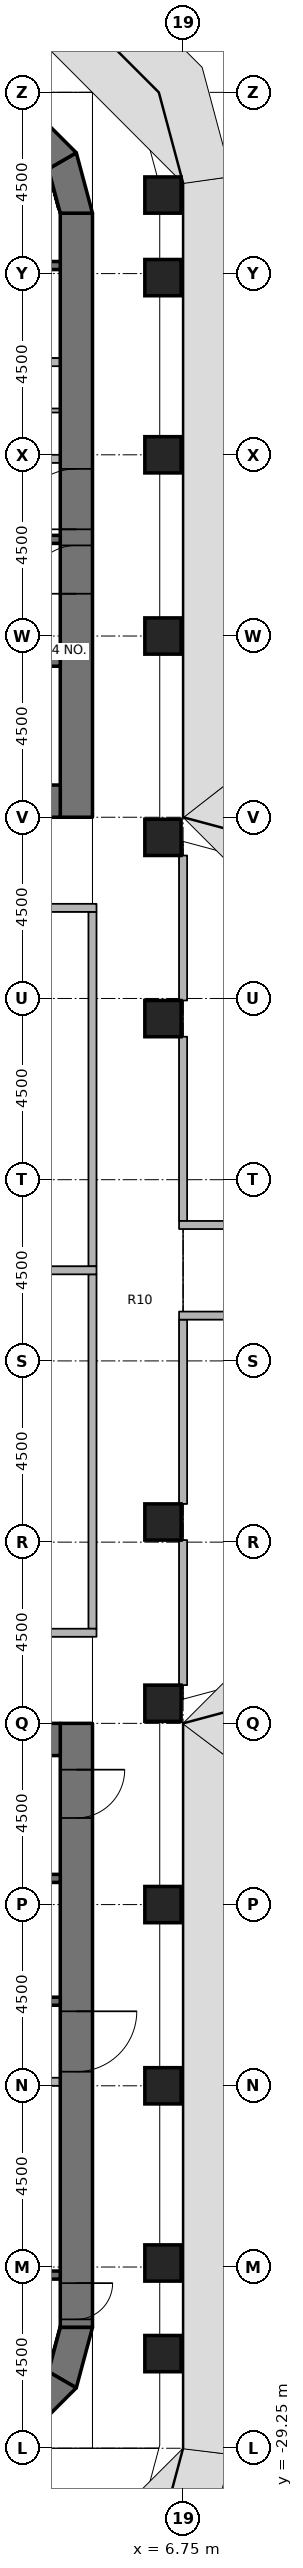
"""IFC4 building model, lengths in metres.
Left out: names, types, materials, properties, quantities, classifications, styles, units other than length and angle.
Written with IfcOpenShell. Run it as: python <this file> out.ifc"""

import sys

from ifc_helpers import new_model, si_unit, direction, frame, frame_2d, origin, origin_2d, place, context, subcontext, project, spatial, polyline, rectangle, outline, extrude, element, fill, save


model = new_model("IFC4")
c1 = context("Model", 3, precision=1e-05, world=origin(), true_north=direction((0.0, 1.0)))
c2 = subcontext(c1, "Body", "Model", "MODEL_VIEW")
j1 = project(units=[si_unit("LENGTHUNIT", "METRE"), si_unit("PLANEANGLEUNIT", "RADIAN")], contexts=[c1])
p1 = place(None, origin())
s1 = spatial("IfcSite", under=j1, at=p1, CompositionType="ELEMENT")
p2 = place(p1, origin())
s2 = spatial("IfcBuilding", under=s1, at=p2, CompositionType="ELEMENT")
p3 = place(p2, frame((0.0, 0.0, 117.0)))
s3 = spatial("IfcBuildingStorey", under=s2, at=p3, CompositionType="ELEMENT", Elevation=117.0)
for number, where, z_axis, x_axis in (
    (1, (6.25, -26.9, 0.0), (0.0, 0.0, 1.0), (1.0, 0.0, 0.0)),
    (2, (6.25, -24.65, 0.0), (0.0, 0.0, 1.0), (1.0, 0.0, 0.0)),
    (3, (6.25, -20.25, 0.0), (0.0, 0.0, 1.0), (1.0, 0.0, 0.0)),
    (4, (6.25, -15.75, 0.0), (0.0, 0.0, 1.0), (1.0, 0.0, 0.0)),
    (5, (6.25, -10.75, 0.0), (0.0, 0.0, 1.0), (1.0, 0.0, 0.0)),
    (6, (6.25, -6.25, 0.0), (0.0, 0.0, 1.0), (1.0, 0.0, 0.0)),
    (7, (6.25, 6.25, 0.0), (0.0, 0.0, 1.0), (1.0, 0.0, 0.0)),
    (8, (6.25, 10.75, 0.0), (0.0, 0.0, 1.0), (1.0, 0.0, 0.0)),
    (9, (6.25, 15.75, 0.0), (0.0, 0.0, 1.0), (1.0, 0.0, 0.0)),
    (10, (6.25, 20.25, 0.0), (0.0, 0.0, 1.0), (1.0, 0.0, 0.0)),
    (11, (6.25, 24.65, 0.0), (0.0, 0.0, 1.0), (1.0, 0.0, 0.0)),
    (12, (6.25, 26.7, 0.0), (0.0, 0.0, 1.0), (1.0, 0.0, 0.0)),
):
    element("IfcColumn", number, at=place(p3, frame(where, z_axis=z_axis, x_axis=x_axis)), inside=s3, PredefinedType="COLUMN", context=c2, shape_type="SweptSolid", body=[
        extrude(rectangle(XDim=0.9, YDim=0.9, at=origin_2d()), origin(), (0.0, 0.0, 1.0), 3.65),
    ])
p4 = place(p3, frame((4.1, 11.25, 0.0), z_axis=(0.0, 0.0, 1.0), x_axis=(0.0, 1.0, 0.0)))
e13 = element("IfcWall", 13, at=p4, inside=s3, PredefinedType="SHEAR", context=c2, shape_type="SweptSolid", body=[
    extrude(rectangle(XDim=15.0, YDim=0.8, at=frame_2d((7.5, 0.0))), origin(), (0.0, 0.0, 1.0), 3.8),
])
p5 = place(p4, frame((7.15, 0.0, 0.0)))
e14 = element("IfcOpeningElement", 14, at=p5, cuts=e13, PredefinedType="OPENING", context=c2, shape_type="SweptSolid", body=[
    extrude(rectangle(XDim=1.5, YDim=2.3, at=frame_2d((0.75, 1.15))), frame((0.0, 0.41, 0.0), z_axis=(0.0, -1.0, 0.0), x_axis=(1.0, 0.0, 0.0)), (0.0, 0.0, 1.0), 0.82),
])
p6 = place(p4, frame((5.55, 0.0, 0.0)))
e15 = element("IfcOpeningElement", 15, at=p6, cuts=e13, PredefinedType="OPENING", context=c2, shape_type="SweptSolid", body=[
    extrude(rectangle(XDim=1.2, YDim=2.1, at=frame_2d((0.6, 1.05))), frame((0.0, 0.41, 0.0), z_axis=(0.0, -1.0, 0.0), x_axis=(1.0, 0.0, 0.0)), (0.0, 0.0, 1.0), 0.82),
])
p7 = place(p3, frame((-3.7, 11.65, 0.0), z_axis=(0.0, 0.0, 1.0), x_axis=(1.0, 0.0, 0.0)))
e16 = element("IfcWall", 16, at=p7, inside=s3, PredefinedType="SHEAR", context=c2, shape_type="SweptSolid", body=[
    extrude(rectangle(XDim=7.4, YDim=0.8, at=frame_2d((3.7, 0.0))), origin(), (0.0, 0.0, 1.0), 3.8),
])
p8 = place(p3, origin())
e17 = element("IfcWall", 17, at=p8, inside=s3, PredefinedType="SHEAR", context=c2, shape_type="SweptSolid", body=[
    extrude(outline(polyline([(4.5, 26.25), (4.098, 27.75), (3.405, 27.35), (3.7, 26.25), (4.5, 26.25)])), origin(), (0.0, 0.0, 1.0), 3.8),
])
p9 = place(p3, origin())
e18 = element("IfcWall", 18, at=p9, inside=s3, PredefinedType="SHEAR", context=c2, shape_type="SweptSolid", body=[
    extrude(outline(polyline([(4.098, 27.75), (3.0, 28.848), (2.6, 28.155), (3.405, 27.35), (4.098, 27.75)])), origin(), (0.0, 0.0, 1.0), 3.8),
])
p10 = place(p3, frame((4.1, -11.25, 0.0), z_axis=(0.0, 0.0, 1.0), x_axis=(0.0, -1.0, 0.0)))
e19 = element("IfcWall", 19, at=p10, inside=s3, PredefinedType="SHEAR", context=c2, shape_type="SweptSolid", body=[
    extrude(rectangle(XDim=15.0, YDim=0.8, at=frame_2d((7.5, 0.0))), origin(), (0.0, 0.0, 1.0), 3.8),
])
p11 = place(p10, frame((7.15, 0.0, 0.0)))
e20 = element("IfcOpeningElement", 20, at=p11, cuts=e19, PredefinedType="OPENING", context=c2, shape_type="SweptSolid", body=[
    extrude(rectangle(XDim=1.5, YDim=2.3, at=frame_2d((0.75, 1.15))), frame((0.0, 0.41, 0.0), z_axis=(0.0, -1.0, 0.0), x_axis=(1.0, 0.0, 0.0)), (0.0, 0.0, 1.0), 0.82),
])
p12 = place(p10, frame((13.9, 0.0, 0.0)))
e21 = element("IfcOpeningElement", 21, at=p12, cuts=e19, PredefinedType="OPENING", context=c2, shape_type="SweptSolid", body=[
    extrude(rectangle(XDim=0.9, YDim=2.1, at=frame_2d((0.45, 1.05))), frame((0.0, 0.41, 0.0), z_axis=(0.0, -1.0, 0.0), x_axis=(1.0, 0.0, 0.0)), (0.0, 0.0, 1.0), 0.82),
])
p13 = place(p10, frame((1.15, 0.0, 0.0)))
e22 = element("IfcOpeningElement", 22, at=p13, cuts=e19, PredefinedType="OPENING", context=c2, shape_type="SweptSolid", body=[
    extrude(rectangle(XDim=1.2, YDim=2.1, at=frame_2d((0.6, 1.05))), frame((0.0, 0.41, 0.0), z_axis=(0.0, -1.0, 0.0), x_axis=(1.0, 0.0, 0.0)), (0.0, 0.0, 1.0), 0.82),
])
p14 = place(p3, frame((-3.7, -11.65, 0.0), z_axis=(0.0, 0.0, 1.0), x_axis=(1.0, 0.0, 0.0)))
e23 = element("IfcWall", 23, at=p14, inside=s3, PredefinedType="SHEAR", context=c2, shape_type="SweptSolid", body=[
    extrude(rectangle(XDim=7.4, YDim=0.8, at=frame_2d((3.7, 0.0))), origin(), (0.0, 0.0, 1.0), 3.8),
])
p15 = place(p3, origin())
e24 = element("IfcWall", 24, at=p15, inside=s3, PredefinedType="SHEAR", context=c2, shape_type="SweptSolid", body=[
    extrude(outline(polyline([(4.5, -26.25), (4.098, -27.75), (3.405, -27.35), (3.7, -26.25), (4.5, -26.25)])), origin(), (0.0, 0.0, 1.0), 3.8),
])
p16 = place(p3, origin())
e25 = element("IfcWall", 25, at=p16, inside=s3, PredefinedType="SHEAR", context=c2, shape_type="SweptSolid", body=[
    extrude(outline(polyline([(4.098, -27.75), (3.0, -28.848), (2.6, -28.155), (3.405, -27.35), (4.098, -27.75)])), origin(), (0.0, 0.0, 1.0), 3.8),
])
for number, where, z_axis, x_axis in (
    (26, (-3.7, 24.95, 0.0), (0.0, 0.0, 1.0), (1.0, 0.0, 0.0)),
    (27, (-3.7, 18.15, 0.0), (0.0, 0.0, 1.0), (1.0, 0.0, 0.0)),
    (28, (-3.7, 15.1, 0.0), (0.0, 0.0, 1.0), (1.0, 0.0, 0.0)),
):
    element("IfcWall", number, at=place(p3, frame(where, z_axis=z_axis, x_axis=x_axis)), inside=s3, PredefinedType="SHEAR", context=c2, shape_type="SweptSolid", body=[
        extrude(rectangle(XDim=7.4, YDim=0.2, at=frame_2d((3.7, 0.0))), origin(), (0.0, 0.0, 1.0), 3.65),
    ])
p17 = place(p3, frame((0.9, 20.15, 0.0), z_axis=(0.0, 0.0, 1.0), x_axis=(1.0, 0.0, 0.0)))
e29 = element("IfcWall", 29, at=p17, inside=s3, PredefinedType="PARTITIONING", context=c2, shape_type="SweptSolid", body=[
    extrude(rectangle(XDim=2.8, YDim=0.2, at=frame_2d((1.4, 0.0))), origin(), (0.0, 0.0, 1.0), 3.65),
])
p18 = place(p3, frame((1.1, 22.55, 0.0), z_axis=(0.0, 0.0, 1.0), x_axis=(1.0, 0.0, 0.0)))
e30 = element("IfcWall", 30, at=p18, inside=s3, PredefinedType="PARTITIONING", context=c2, shape_type="SweptSolid", body=[
    extrude(rectangle(XDim=2.6, YDim=0.2, at=frame_2d((1.3, 0.0))), origin(), (0.0, 0.0, 1.0), 3.65),
])
p19 = place(p3, frame((1.1, 21.35, 0.0), z_axis=(0.0, 0.0, 1.0), x_axis=(1.0, 0.0, 0.0)))
e31 = element("IfcWall", 31, at=p19, inside=s3, PredefinedType="PARTITIONING", context=c2, shape_type="SweptSolid", body=[
    extrude(rectangle(XDim=2.6, YDim=0.1, at=frame_2d((1.3, 0.0))), origin(), (0.0, 0.0, 1.0), 3.65),
])
for number, where, z_axis, x_axis in (
    (32, (3.7, -24.95, 0.0), (0.0, 0.0, 1.0), (-1.0, 0.0, 0.0)),
    (33, (3.7, -18.15, 0.0), (0.0, 0.0, 1.0), (-1.0, 0.0, 0.0)),
    (34, (3.7, -15.1, 0.0), (0.0, 0.0, 1.0), (-1.0, 0.0, 0.0)),
):
    element("IfcWall", number, at=place(p3, frame(where, z_axis=z_axis, x_axis=x_axis)), inside=s3, PredefinedType="SHEAR", context=c2, shape_type="SweptSolid", body=[
        extrude(rectangle(XDim=7.4, YDim=0.2, at=frame_2d((3.7, 0.0))), origin(), (0.0, 0.0, 1.0), 3.65),
    ])
p20 = place(p3, frame((3.7, -20.15, 0.0), z_axis=(0.0, 0.0, 1.0), x_axis=(-1.0, 0.0, 0.0)))
e35 = element("IfcWall", 35, at=p20, inside=s3, PredefinedType="PARTITIONING", context=c2, shape_type="SweptSolid", body=[
    extrude(rectangle(XDim=2.8, YDim=0.2, at=frame_2d((1.4, 0.0))), origin(), (0.0, 0.0, 1.0), 3.65),
])
for number, where, z_axis, x_axis in (
    (36, (4.5, 0.1, 0.0), (0.0, 0.0, 1.0), (0.0, 1.0, 0.0)),
    (37, (4.5, -8.9, 0.0), (0.0, 0.0, 1.0), (0.0, 1.0, 0.0)),
):
    element("IfcWall", number, at=place(p3, frame(where, z_axis=z_axis, x_axis=x_axis)), inside=s3, PredefinedType="PARTITIONING", context=c2, shape_type="SweptSolid", body=[
        extrude(rectangle(XDim=8.8, YDim=0.2, at=frame_2d((4.4, 0.0))), origin(), (0.0, 0.0, 1.0), 2.738),
    ])
p21 = place(p3, frame((6.75, 1.225, 0.0), z_axis=(0.0, 0.0, 1.0), x_axis=(0.0, 1.0, 0.0)))
e38 = element("IfcWall", 38, at=p21, inside=s3, PredefinedType="PARTITIONING", context=c2, shape_type="SweptSolid", body=[
    extrude(rectangle(XDim=4.575, YDim=0.2, at=frame_2d((2.288, 0.0))), origin(), (0.0, 0.0, 1.0), 2.738),
])
for number, where, z_axis, x_axis in (
    (39, (6.75, 6.7, 0.0), (0.0, 0.0, 1.0), (0.0, 1.0, 0.0)),
    (40, (6.75, -10.3, 0.0), (0.0, 0.0, 1.0), (0.0, 1.0, 0.0)),
):
    element("IfcWall", number, at=place(p3, frame(where, z_axis=z_axis, x_axis=x_axis)), inside=s3, PredefinedType="PARTITIONING", context=c2, shape_type="SweptSolid", body=[
        extrude(rectangle(XDim=3.6, YDim=0.2, at=frame_2d((1.8, 0.0))), origin(), (0.0, 0.0, 1.0), 2.738),
    ])
p22 = place(p3, frame((6.75, -5.8, 0.0), z_axis=(0.0, 0.0, 1.0), x_axis=(0.0, 1.0, 0.0)))
e41 = element("IfcWall", 41, at=p22, inside=s3, PredefinedType="PARTITIONING", context=c2, shape_type="SweptSolid", body=[
    extrude(rectangle(XDim=4.575, YDim=0.2, at=frame_2d((2.288, 0.0))), origin(), (0.0, 0.0, 1.0), 2.738),
])
p23 = place(p3, frame((4.6, 9.0, 0.0), z_axis=(0.0, 0.0, 1.0), x_axis=(-1.0, 0.0, 0.0)))
e42 = element("IfcWall", 42, at=p23, inside=s3, PredefinedType="PARTITIONING", context=c2, shape_type="SweptSolid", body=[
    extrude(rectangle(XDim=9.2, YDim=0.2, at=frame_2d((4.6, 0.0))), origin(), (0.0, 0.0, 1.0), 2.738),
])
p24 = place(p23, frame((4.1, 0.0, 0.0)))
e43 = element("IfcOpeningElement", 43, at=p24, cuts=e42, PredefinedType="OPENING", context=c2, shape_type="SweptSolid", body=[
    extrude(rectangle(XDim=1.0, YDim=2.1, at=frame_2d((0.5, 1.05))), frame((0.0, 0.11, 0.0), z_axis=(0.0, -1.0, 0.0), x_axis=(1.0, 0.0, 0.0)), (0.0, 0.0, 1.0), 0.22),
])
p25 = place(p3, frame((-4.6, -9.0, 0.0), z_axis=(0.0, 0.0, 1.0), x_axis=(1.0, 0.0, 0.0)))
e44 = element("IfcWall", 44, at=p25, inside=s3, PredefinedType="PARTITIONING", context=c2, shape_type="SweptSolid", body=[
    extrude(rectangle(XDim=9.2, YDim=0.2, at=frame_2d((4.6, 0.0))), origin(), (0.0, 0.0, 1.0), 2.738),
])
p26 = place(p25, frame((4.1, 0.0, 0.0)))
e45 = element("IfcOpeningElement", 45, at=p26, cuts=e44, PredefinedType="OPENING", context=c2, shape_type="SweptSolid", body=[
    extrude(rectangle(XDim=1.0, YDim=2.1, at=frame_2d((0.5, 1.05))), frame((0.0, 0.11, 0.0), z_axis=(0.0, -1.0, 0.0), x_axis=(1.0, 0.0, 0.0)), (0.0, 0.0, 1.0), 0.22),
])
p27 = place(p3, frame((-4.6, 0.0, 0.0), z_axis=(0.0, 0.0, 1.0), x_axis=(1.0, 0.0, 0.0)))
e46 = element("IfcWall", 46, at=p27, inside=s3, PredefinedType="PARTITIONING", context=c2, shape_type="SweptSolid", body=[
    extrude(rectangle(XDim=9.2, YDim=0.2, at=frame_2d((4.6, 0.0))), origin(), (0.0, 0.0, 1.0), 2.738),
])
p28 = place(p3, frame((6.65, 1.125, 0.0), z_axis=(0.0, 0.0, 1.0), x_axis=(1.0, 0.0, 0.0)))
e47 = element("IfcWall", 47, at=p28, inside=s3, PredefinedType="PARTITIONING", context=c2, shape_type="SweptSolid", body=[
    extrude(rectangle(XDim=4.7, YDim=0.2, at=frame_2d((2.35, 0.0))), origin(), (0.0, 0.0, 1.0), 2.738),
])
p29 = place(p28, frame((1.85, 0.0, 0.0)))
e48 = element("IfcOpeningElement", 48, at=p29, cuts=e47, PredefinedType="OPENING", context=c2, shape_type="SweptSolid", body=[
    extrude(rectangle(XDim=1.0, YDim=2.1, at=frame_2d((0.5, 1.05))), frame((0.0, 0.11, 0.0), z_axis=(0.0, -1.0, 0.0), x_axis=(1.0, 0.0, 0.0)), (0.0, 0.0, 1.0), 0.22),
])
p30 = place(p3, frame((11.35, -1.125, 0.0), z_axis=(0.0, 0.0, 1.0), x_axis=(-1.0, 0.0, 0.0)))
e49 = element("IfcWall", 49, at=p30, inside=s3, PredefinedType="PARTITIONING", context=c2, shape_type="SweptSolid", body=[
    extrude(rectangle(XDim=4.7, YDim=0.2, at=frame_2d((2.35, 0.0))), origin(), (0.0, 0.0, 1.0), 2.738),
])
p31 = place(p30, frame((1.85, 0.0, 0.0)))
e50 = element("IfcOpeningElement", 50, at=p31, cuts=e49, PredefinedType="OPENING", context=c2, shape_type="SweptSolid", body=[
    extrude(rectangle(XDim=1.0, YDim=2.1, at=frame_2d((0.5, 1.05))), frame((0.0, 0.11, 0.0), z_axis=(0.0, -1.0, 0.0), x_axis=(1.0, 0.0, 0.0)), (0.0, 0.0, 1.0), 0.22),
])
p32 = place(p5, origin())
e51 = element("IfcDoor", 51, at=p32, inside=s3, OperationType="DOUBLE_DOOR_SINGLE_SWING", PredefinedType="DOOR", context=c2, shape_type="SweptSolid", body=[
    extrude(rectangle(XDim=1.5, YDim=2.3, at=frame_2d((0.75, 1.15))), frame((0.0, 0.025, 0.0), z_axis=(0.0, -1.0, 0.0), x_axis=(1.0, 0.0, 0.0)), (0.0, 0.0, 1.0), 0.05),
])
fill(e14, e51)
p33 = place(p6, origin())
e52 = element("IfcDoor", 52, at=p33, inside=s3, OperationType="SINGLE_SWING_RIGHT", PredefinedType="DOOR", context=c2, shape_type="SweptSolid", body=[
    extrude(rectangle(XDim=1.2, YDim=2.1, at=frame_2d((0.6, 1.05))), frame((0.0, 0.025, 0.0), z_axis=(0.0, -1.0, 0.0), x_axis=(1.0, 0.0, 0.0)), (0.0, 0.0, 1.0), 0.05),
])
fill(e15, e52)
p34 = place(p11, origin())
e53 = element("IfcDoor", 53, at=p34, inside=s3, OperationType="DOUBLE_DOOR_SINGLE_SWING", PredefinedType="DOOR", context=c2, shape_type="SweptSolid", body=[
    extrude(rectangle(XDim=1.5, YDim=2.3, at=frame_2d((0.75, 1.15))), frame((0.0, 0.025, 0.0), z_axis=(0.0, -1.0, 0.0), x_axis=(1.0, 0.0, 0.0)), (0.0, 0.0, 1.0), 0.05),
])
fill(e20, e53)
p35 = place(p12, origin())
e54 = element("IfcDoor", 54, at=p35, inside=s3, OperationType="SINGLE_SWING_RIGHT", PredefinedType="DOOR", context=c2, shape_type="SweptSolid", body=[
    extrude(rectangle(XDim=0.9, YDim=2.1, at=frame_2d((0.45, 1.05))), frame((0.0, 0.025, 0.0), z_axis=(0.0, -1.0, 0.0), x_axis=(1.0, 0.0, 0.0)), (0.0, 0.0, 1.0), 0.05),
])
fill(e21, e54)
p36 = place(p13, origin())
e55 = element("IfcDoor", 55, at=p36, inside=s3, OperationType="SINGLE_SWING_LEFT", PredefinedType="DOOR", context=c2, shape_type="SweptSolid", body=[
    extrude(rectangle(XDim=1.2, YDim=2.1, at=frame_2d((0.6, 1.05))), frame((0.0, 0.025, 0.0), z_axis=(0.0, -1.0, 0.0), x_axis=(1.0, 0.0, 0.0)), (0.0, 0.0, 1.0), 0.05),
])
fill(e22, e55)
save(model, sys.argv[1])
